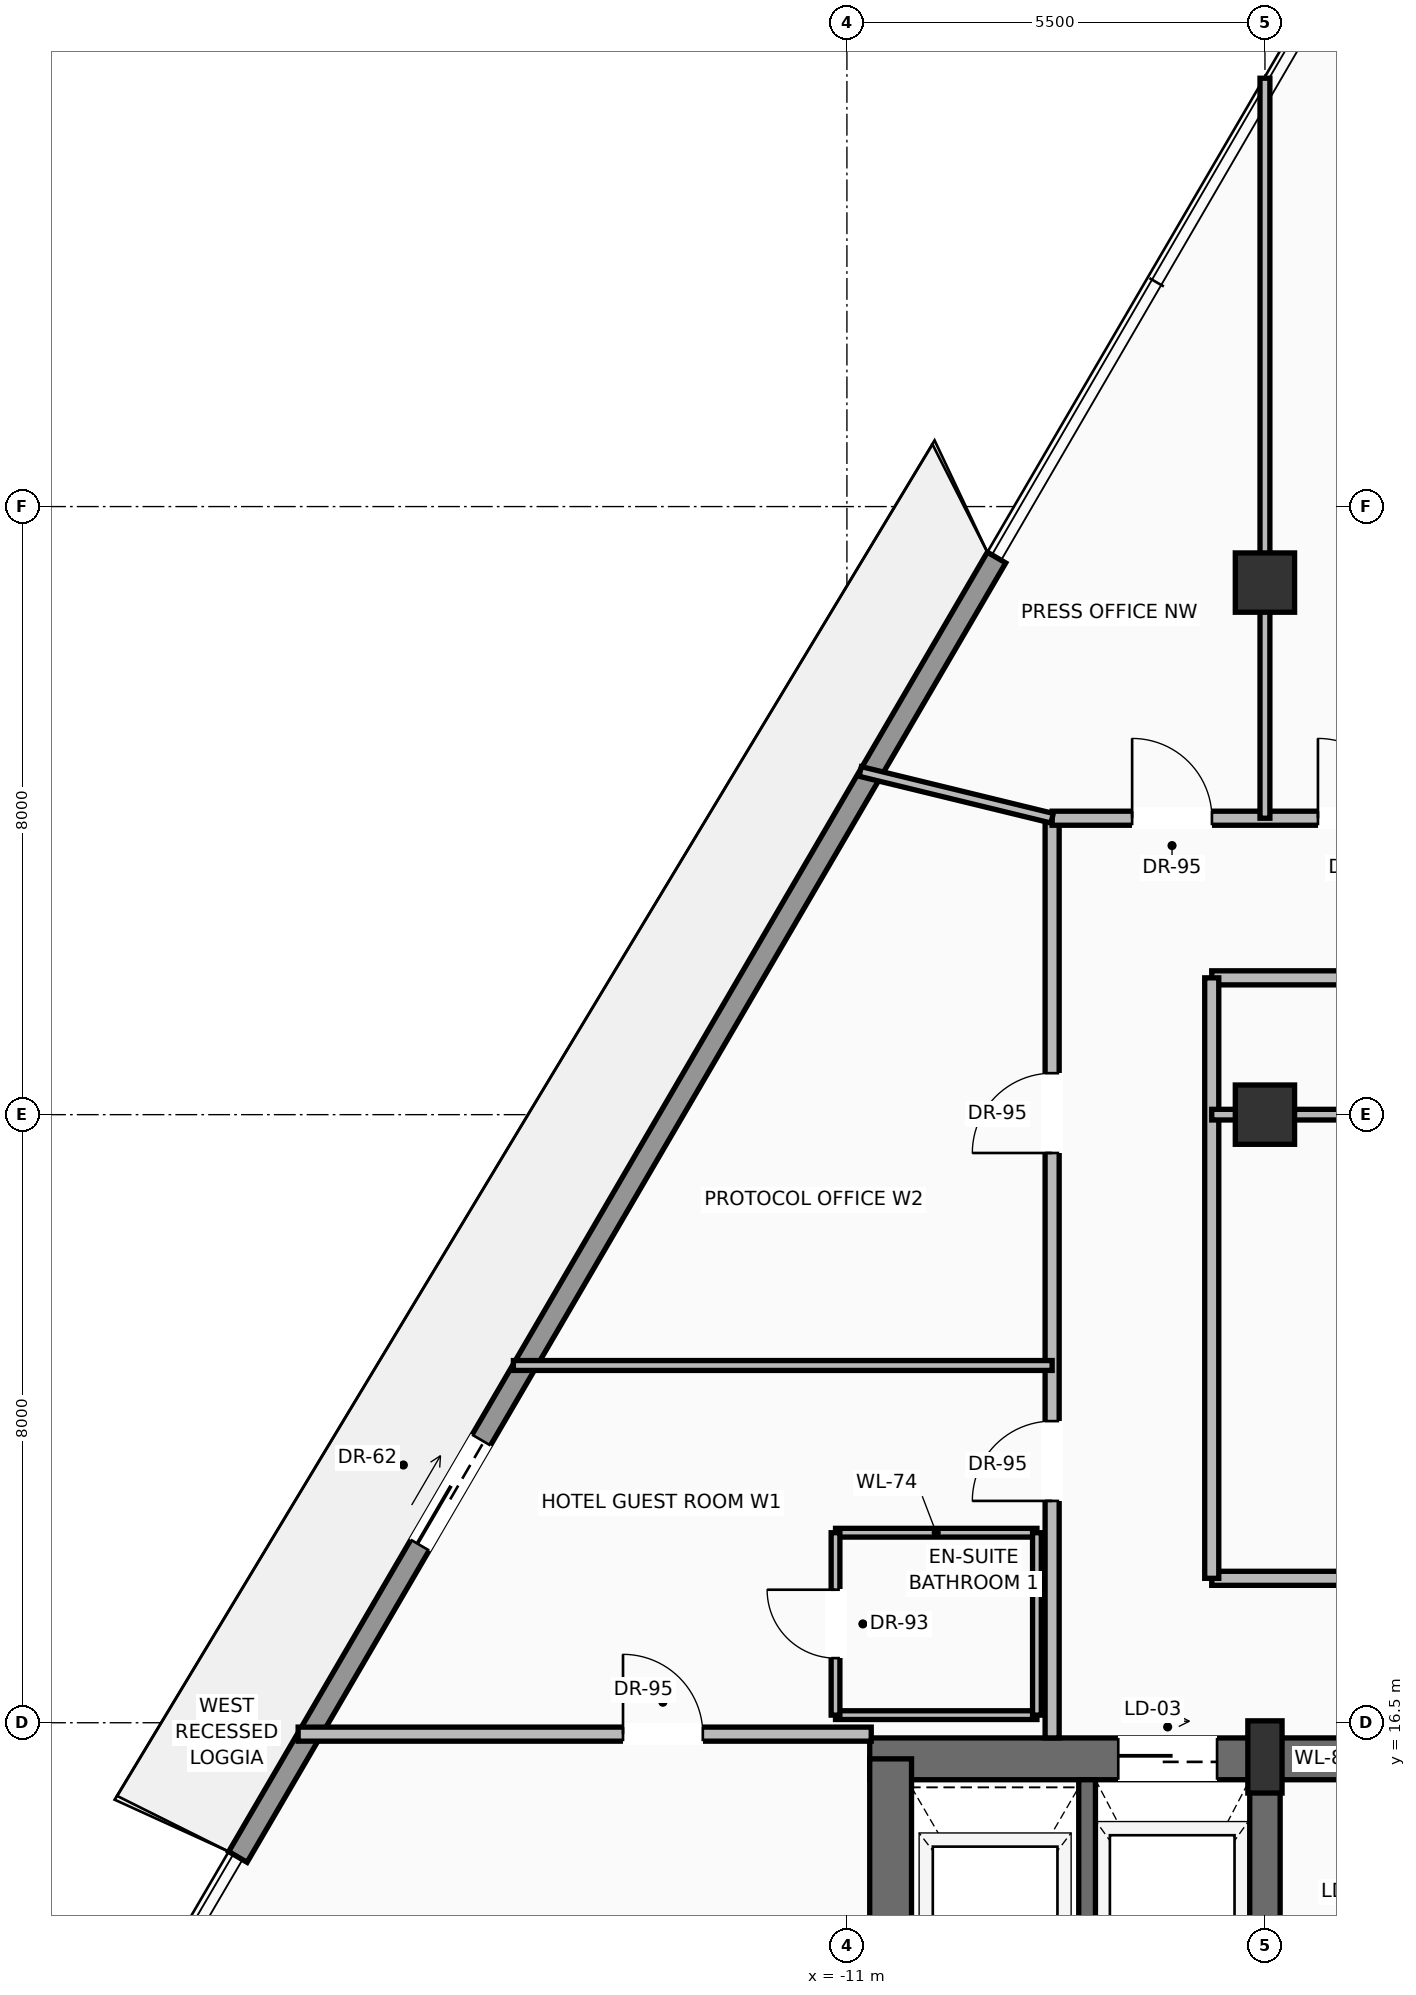
"""IFC4 building model, lengths in metres.
Left out: names, types, materials, properties, quantities, classifications, styles, units other than length and angle.
Written with IfcOpenShell. Run it as: python <this file> out.ifc"""

import sys

from ifc_helpers import new_model, si_unit, direction, frame, frame_2d, origin, origin_2d, place, context, subcontext, project, spatial, rectangle, extrude, source, transform, mapped, element, fill, save


model = new_model("IFC4")
c1 = context("Model", 3, precision=1e-05, world=origin(), true_north=direction((0.0, 1.0)))
c2 = subcontext(c1, "Body", "Model", "MODEL_VIEW")
j1 = project(units=[si_unit("LENGTHUNIT", "METRE"), si_unit("PLANEANGLEUNIT", "RADIAN")], contexts=[c1])
p1 = place(None, origin())
s1 = spatial("IfcSite", under=j1, at=p1, CompositionType="ELEMENT")
p2 = place(p1, origin())
s2 = spatial("IfcBuilding", under=s1, at=p2, CompositionType="ELEMENT")
p3 = place(p2, frame((0.0, 0.0, 254.5)))
s3 = spatial("IfcBuildingStorey", under=s2, at=p3, CompositionType="ELEMENT", Elevation=254.5)
p4 = place(p3, frame((-10.7, 16.025, 0.0), z_axis=(0.0, 0.0, 1.0), x_axis=(1.0, 0.0, 0.0)))
e1 = element("IfcWall", 1, at=p4, inside=s3, PredefinedType="SHEAR", context=c2, shape_type="SweptSolid", body=[
    extrude(rectangle(XDim=21.4, YDim=0.55, at=frame_2d((10.7, 0.0))), origin(), (0.0, 0.0, 1.0), 3.15),
])
p5 = place(p4, frame((3.27, 0.0, 0.0)))
e2 = element("IfcOpeningElement", 2, at=p5, cuts=e1, PredefinedType="OPENING", context=c2, shape_type="SweptSolid", body=[
    extrude(rectangle(XDim=1.3, YDim=2.3, at=frame_2d((0.65, 1.15))), frame((0.0, 0.285, 0.0), z_axis=(0.0, -1.0, 0.0), x_axis=(1.0, 0.0, 0.0)), (0.0, 0.0, 1.0), 0.57),
])
p6 = place(p4, frame((9.7, 0.0, 0.0)))
e3 = element("IfcOpeningElement", 3, at=p6, cuts=e1, PredefinedType="OPENING", context=c2, shape_type="SweptSolid", body=[
    extrude(rectangle(XDim=2.0, YDim=2.4, at=frame_2d((1.0, 1.2))), frame((0.0, 0.285, 0.0), z_axis=(0.0, -1.0, 0.0), x_axis=(1.0, 0.0, 0.0)), (0.0, 0.0, 1.0), 0.57),
])
p7 = place(p3, frame((-10.425, 0.575, 0.0), z_axis=(0.0, 0.0, 1.0), x_axis=(0.0, 1.0, 0.0)))
e4 = element("IfcWall", 4, at=p7, inside=s3, PredefinedType="SHEAR", context=c2, shape_type="SweptSolid", body=[
    extrude(rectangle(XDim=15.45, YDim=0.55, at=frame_2d((7.725, 0.0))), origin(), (0.0, 0.0, 1.0), 3.15),
])
p8 = place(p3, frame((-5.5, 0.575, 0.0), z_axis=(0.0, 0.0, 1.0), x_axis=(0.0, 1.0, 0.0)))
e5 = element("IfcWall", 5, at=p8, inside=s3, PredefinedType="SHEAR", context=c2, shape_type="SweptSolid", body=[
    extrude(rectangle(XDim=15.45, YDim=0.4, at=frame_2d((7.725, 0.0))), origin(), (0.0, 0.0, 1.0), 3.15),
])
p9 = place(p8, frame((8.925, 0.0, 0.0)))
e6 = element("IfcOpeningElement", 6, at=p9, cuts=e5, PredefinedType="OPENING", context=c2, shape_type="SweptSolid", body=[
    extrude(rectangle(XDim=1.1, YDim=2.2, at=frame_2d((0.55, 1.1))), frame((0.0, 0.21, 0.0), z_axis=(0.0, -1.0, 0.0), x_axis=(1.0, 0.0, 0.0)), (0.0, 0.0, 1.0), 0.42),
])
m1 = source(origin(), c2, "Body", "SweptSolid", [
    extrude(rectangle(XDim=0.45, YDim=0.95, at=origin_2d()), origin(), (0.0, 0.0, 1.0), 3.45),
])
p10 = place(p3, frame((-5.5, 16.05, 0.0), z_axis=(0.0, 0.0, 1.0), x_axis=(1.0, 0.0, 0.0)))
e7 = element("IfcColumn", 7, at=p10, inside=s3, PredefinedType="PILASTER", context=c2, shape_type="MappedRepresentation", body=[
    mapped(m1, transform((0.0, 0.0, 0.0), scale=1.0)),
])
m2 = source(origin(), c2, "Body", "SweptSolid", [
    extrude(rectangle(XDim=0.78, YDim=0.78, at=origin_2d()), origin(), (0.0, 0.0, 1.0), 3.45),
])
for number, where, z_axis, x_axis in (
    (8, (-5.5, 24.5, 0.0), (0.0, 0.0, 1.0), (1.0, 0.0, 0.0)),
    (9, (-5.5, 31.5, 0.0), (0.0, 0.0, 1.0), (1.0, 0.0, 0.0)),
):
    element("IfcColumn", number, at=place(p3, frame(where, z_axis=z_axis, x_axis=x_axis)), inside=s3, PredefinedType="COLUMN", context=c2, shape_type="MappedRepresentation", body=[
        mapped(m2, transform((0.0, 0.0, 0.0), scale=1.0)),
    ])
p11 = place(p3, frame((-19.013, 14.734, 0.0), z_axis=(0.0, 0.0, 1.0), x_axis=(0.504219118022, 0.863575752914, 0.0)))
e10 = element("IfcWall", 10, at=p11, inside=s3, PredefinedType="SOLIDWALL", context=c2, shape_type="SweptSolid", body=[
    extrude(rectangle(XDim=19.796, YDim=0.28, at=frame_2d((9.898, 0.0))), origin(), (0.0, 0.0, 1.0), 2.73),
])
p12 = place(p11, frame((4.751, 0.0, 0.0)))
e11 = element("IfcOpeningElement", 11, at=p12, cuts=e10, PredefinedType="OPENING", context=c2, shape_type="SweptSolid", body=[
    extrude(rectangle(XDim=1.6, YDim=2.35, at=frame_2d((0.8, 1.175))), frame((0.0, 0.15, 0.0), z_axis=(0.0, -1.0, 0.0), x_axis=(1.0, 0.0, 0.0)), (0.0, 0.0, 1.0), 0.3),
])
p13 = place(p3, frame((-7.84, 11.87, 0.0), z_axis=(0.0, 0.0, 1.0), x_axis=(0.0, 1.0, 0.0)))
e12 = element("IfcWall", 12, at=p13, inside=s3, PredefinedType="SOLIDWALL", context=c2, shape_type="SweptSolid", body=[
    extrude(rectangle(XDim=3.88, YDim=0.22, at=frame_2d((1.94, 0.0))), origin(), (0.0, 0.0, 1.0), 3.15),
])
p14 = place(p3, frame((-6.2, 18.4, 0.0), z_axis=(0.0, 0.0, 1.0), x_axis=(1.0, 0.0, 0.0)))
e13 = element("IfcWall", 13, at=p14, inside=s3, PredefinedType="PARTITIONING", context=c2, shape_type="SweptSolid", body=[
    extrude(rectangle(XDim=12.6, YDim=0.185, at=frame_2d((6.3, 0.0))), origin(), (0.0, 0.0, 1.0), 3.142),
])
p15 = place(p14, frame((5.825, 0.0, 0.0)))
e14 = element("IfcOpeningElement", 14, at=p15, cuts=e13, PredefinedType="OPENING", context=c2, shape_type="SweptSolid", body=[
    extrude(rectangle(XDim=0.95, YDim=2.2, at=frame_2d((0.475, 1.1))), frame((0.0, 0.103, 0.0), z_axis=(0.0, -1.0, 0.0), x_axis=(1.0, 0.0, 0.0)), (0.0, 0.0, 1.0), 0.205),
])
p16 = place(p3, frame((-6.2, 26.3, 0.0), z_axis=(0.0, 0.0, 1.0), x_axis=(1.0, 0.0, 0.0)))
e15 = element("IfcWall", 15, at=p16, inside=s3, PredefinedType="PARTITIONING", context=c2, shape_type="SweptSolid", body=[
    extrude(rectangle(XDim=12.6, YDim=0.185, at=frame_2d((6.3, 0.0))), origin(), (0.0, 0.0, 1.0), 3.142),
])
p17 = place(p16, frame((5.825, 0.0, 0.0)))
e16 = element("IfcOpeningElement", 16, at=p17, cuts=e15, PredefinedType="OPENING", context=c2, shape_type="SweptSolid", body=[
    extrude(rectangle(XDim=0.95, YDim=2.2, at=frame_2d((0.475, 1.1))), frame((0.0, 0.103, 0.0), z_axis=(0.0, -1.0, 0.0), x_axis=(1.0, 0.0, 0.0)), (0.0, 0.0, 1.0), 0.205),
])
p18 = place(p3, frame((-6.2, 18.4, 0.0), z_axis=(0.0, 0.0, 1.0), x_axis=(0.0, 1.0, 0.0)))
e17 = element("IfcWall", 17, at=p18, inside=s3, PredefinedType="PARTITIONING", context=c2, shape_type="SweptSolid", body=[
    extrude(rectangle(XDim=7.9, YDim=0.185, at=frame_2d((3.95, 0.0))), origin(), (0.0, 0.0, 1.0), 3.142),
])
p19 = place(p3, frame((-8.3, 16.3, 0.0), z_axis=(0.0, 0.0, 1.0), x_axis=(0.0, 1.0, 0.0)))
e18 = element("IfcWall", 18, at=p19, inside=s3, PredefinedType="PARTITIONING", context=c2, shape_type="SweptSolid", body=[
    extrude(rectangle(XDim=12.1, YDim=0.185, at=frame_2d((6.05, 0.0))), origin(), (0.0, 0.0, 1.0), 3.142),
])
p20 = place(p19, frame((3.118, 0.0, 0.0)))
e19 = element("IfcOpeningElement", 19, at=p20, cuts=e18, PredefinedType="OPENING", context=c2, shape_type="SweptSolid", body=[
    extrude(rectangle(XDim=1.05, YDim=2.25, at=frame_2d((0.525, 1.125))), frame((0.0, 0.103, 0.0), z_axis=(0.0, -1.0, 0.0), x_axis=(1.0, 0.0, 0.0)), (0.0, 0.0, 1.0), 0.205),
])
p21 = place(p19, frame((7.696, 0.0, 0.0)))
e20 = element("IfcOpeningElement", 20, at=p21, cuts=e18, PredefinedType="OPENING", context=c2, shape_type="SweptSolid", body=[
    extrude(rectangle(XDim=1.05, YDim=2.25, at=frame_2d((0.525, 1.125))), frame((0.0, 0.103, 0.0), z_axis=(0.0, -1.0, 0.0), x_axis=(1.0, 0.0, 0.0)), (0.0, 0.0, 1.0), 0.205),
])
p22 = place(p3, frame((-8.3, 28.4, 0.0), z_axis=(0.0, 0.0, 1.0), x_axis=(1.0, 0.0, 0.0)))
e21 = element("IfcWall", 21, at=p22, inside=s3, PredefinedType="PARTITIONING", context=c2, shape_type="SweptSolid", body=[
    extrude(rectangle(XDim=16.8, YDim=0.185, at=frame_2d((8.4, 0.0))), origin(), (0.0, 0.0, 1.0), 3.142),
])
p23 = place(p22, frame((3.498, 0.0, 0.0)))
e22 = element("IfcOpeningElement", 22, at=p23, cuts=e21, PredefinedType="OPENING", context=c2, shape_type="SweptSolid", body=[
    extrude(rectangle(XDim=1.05, YDim=2.25, at=frame_2d((0.525, 1.125))), frame((0.0, 0.103, 0.0), z_axis=(0.0, -1.0, 0.0), x_axis=(1.0, 0.0, 0.0)), (0.0, 0.0, 1.0), 0.205),
])
p24 = place(p22, frame((8.998, 0.0, 0.0)))
e23 = element("IfcOpeningElement", 23, at=p24, cuts=e21, PredefinedType="OPENING", context=c2, shape_type="SweptSolid", body=[
    extrude(rectangle(XDim=1.05, YDim=2.25, at=frame_2d((0.525, 1.125))), frame((0.0, 0.103, 0.0), z_axis=(0.0, -1.0, 0.0), x_axis=(1.0, 0.0, 0.0)), (0.0, 0.0, 1.0), 0.205),
])
p25 = place(p22, frame((12.052, 0.0, 0.0)))
e24 = element("IfcOpeningElement", 24, at=p25, cuts=e21, PredefinedType="OPENING", context=c2, shape_type="SweptSolid", body=[
    extrude(rectangle(XDim=1.05, YDim=2.25, at=frame_2d((0.525, 1.125))), frame((0.0, 0.103, 0.0), z_axis=(0.0, -1.0, 0.0), x_axis=(1.0, 0.0, 0.0)), (0.0, 0.0, 1.0), 0.205),
])
p26 = place(p22, frame((14.498, 0.0, 0.0)))
e25 = element("IfcOpeningElement", 25, at=p26, cuts=e21, PredefinedType="OPENING", context=c2, shape_type="SweptSolid", body=[
    extrude(rectangle(XDim=1.05, YDim=2.25, at=frame_2d((0.525, 1.125))), frame((0.0, 0.103, 0.0), z_axis=(0.0, -1.0, 0.0), x_axis=(1.0, 0.0, 0.0)), (0.0, 0.0, 1.0), 0.205),
])
p27 = place(p22, frame((1.052, 0.0, 0.0)))
e26 = element("IfcOpeningElement", 26, at=p27, cuts=e21, PredefinedType="OPENING", context=c2, shape_type="SweptSolid", body=[
    extrude(rectangle(XDim=1.05, YDim=2.25, at=frame_2d((0.525, 1.125))), frame((0.0, 0.103, 0.0), z_axis=(0.0, -1.0, 0.0), x_axis=(1.0, 0.0, 0.0)), (0.0, 0.0, 1.0), 0.205),
])
p28 = place(p3, frame((-6.2, 24.5, 0.0), z_axis=(0.0, 0.0, 1.0), x_axis=(1.0, 0.0, 0.0)))
e27 = element("IfcWall", 27, at=p28, inside=s3, PredefinedType="PARTITIONING", context=c2, shape_type="SweptSolid", body=[
    extrude(rectangle(XDim=12.6, YDim=0.14, at=frame_2d((6.3, 0.0))), origin(), (0.0, 0.0, 1.0), 2.593),
])
p29 = place(p3, frame((-18.22, 16.35, 0.0), z_axis=(0.0, 0.0, 1.0), x_axis=(1.0, 0.0, 0.0)))
e28 = element("IfcWall", 28, at=p29, inside=s3, PredefinedType="PARTITIONING", context=c2, shape_type="SweptSolid", body=[
    extrude(rectangle(XDim=7.54, YDim=0.185, at=frame_2d((3.77, 0.0))), origin(), (0.0, 0.0, 1.0), 3.142),
])
p30 = place(p29, frame((4.274, 0.0, 0.0)))
e29 = element("IfcOpeningElement", 29, at=p30, cuts=e28, PredefinedType="OPENING", context=c2, shape_type="SweptSolid", body=[
    extrude(rectangle(XDim=1.05, YDim=2.25, at=frame_2d((0.525, 1.125))), frame((0.0, 0.103, 0.0), z_axis=(0.0, -1.0, 0.0), x_axis=(1.0, 0.0, 0.0)), (0.0, 0.0, 1.0), 0.205),
])
p31 = place(p3, frame((-10.825, 29.015, 0.0), z_axis=(0.0, 0.0, 1.0), x_axis=(0.971578327302, -0.236718300764, 0.0)))
e30 = element("IfcWall", 30, at=p31, inside=s3, PredefinedType="PARTITIONING", context=c2, shape_type="SweptSolid", body=[
    extrude(rectangle(XDim=2.599, YDim=0.13, at=frame_2d((1.3, 0.0))), origin(), (0.0, 0.0, 1.0), 3.142),
])
p32 = place(p3, frame((-5.5, 28.4, 0.0), z_axis=(0.0, 0.0, 1.0), x_axis=(0.0, 1.0, 0.0)))
e31 = element("IfcWall", 31, at=p32, inside=s3, PredefinedType="PARTITIONING", context=c2, shape_type="SweptSolid", body=[
    extrude(rectangle(XDim=9.736, YDim=0.13, at=frame_2d((4.868, 0.0))), origin(), (0.0, 0.0, 1.0), 2.593),
])
for number, where, z_axis, x_axis in (
    (32, (-11.15, 16.6, 0.0), (0.0, 0.0, 1.0), (1.0, 0.0, 0.0)),
    (33, (-11.15, 19.0, 0.0), (0.0, 0.0, 1.0), (1.0, 0.0, 0.0)),
):
    element("IfcWall", number, at=place(p3, frame(where, z_axis=z_axis, x_axis=x_axis)), inside=s3, PredefinedType="PARTITIONING", context=c2, shape_type="SweptSolid", body=[
        extrude(rectangle(XDim=2.65, YDim=0.115, at=frame_2d((1.325, 0.0))), origin(), (0.0, 0.0, 1.0), 3.142),
    ])
p33 = place(p3, frame((-11.15, 16.6, 0.0), z_axis=(0.0, 0.0, 1.0), x_axis=(0.0, 1.0, 0.0)))
e34 = element("IfcWall", 34, at=p33, inside=s3, PredefinedType="PARTITIONING", context=c2, shape_type="SweptSolid", body=[
    extrude(rectangle(XDim=2.4, YDim=0.115, at=frame_2d((1.2, 0.0))), origin(), (0.0, 0.0, 1.0), 3.142),
])
p34 = place(p33, frame((0.75, 0.0, 0.0)))
e35 = element("IfcOpeningElement", 35, at=p34, cuts=e34, PredefinedType="OPENING", context=c2, shape_type="SweptSolid", body=[
    extrude(rectangle(XDim=0.9, YDim=2.15, at=frame_2d((0.45, 1.075))), frame((0.0, 0.067, 0.0), z_axis=(0.0, -1.0, 0.0), x_axis=(1.0, 0.0, 0.0)), (0.0, 0.0, 1.0), 0.135),
])
p35 = place(p3, frame((-8.5, 16.6, 0.0), z_axis=(0.0, 0.0, 1.0), x_axis=(0.0, 1.0, 0.0)))
e36 = element("IfcWall", 36, at=p35, inside=s3, PredefinedType="PARTITIONING", context=c2, shape_type="SweptSolid", body=[
    extrude(rectangle(XDim=2.4, YDim=0.115, at=frame_2d((1.2, 0.0))), origin(), (0.0, 0.0, 1.0), 3.142),
])
p36 = place(p3, frame((-15.388, 21.2, 0.0), z_axis=(0.0, 0.0, 1.0), x_axis=(1.0, 0.0, 0.0)))
e37 = element("IfcWall", 37, at=p36, inside=s3, PredefinedType="PARTITIONING", context=c2, shape_type="SweptSolid", body=[
    extrude(rectangle(XDim=7.088, YDim=0.13, at=frame_2d((3.544, 0.0))), origin(), (0.0, 0.0, 1.0), 3.142),
])
m3 = source(origin(), c2, "Body", "SweptSolid", [
    extrude(rectangle(XDim=1.6, YDim=2.35, at=frame_2d((0.8, 1.175))), frame((0.0, 0.025, 0.0), z_axis=(0.0, -1.0, 0.0), x_axis=(1.0, 0.0, 0.0)), (0.0, 0.0, 1.0), 0.05),
])
p37 = place(p12, origin())
e38 = element("IfcDoor", 38, at=p37, inside=s3, OperationType="SLIDING_TO_LEFT", PredefinedType="DOOR", context=c2, shape_type="MappedRepresentation", body=[
    mapped(m3, transform((0.0, 0.0, 0.0), scale=1.0)),
])
fill(e11, e38)
m4 = source(origin(), c2, "Body", "SweptSolid", [
    extrude(rectangle(XDim=1.3, YDim=2.3, at=frame_2d((0.65, 1.15))), frame((0.0, 0.025, 0.0), z_axis=(0.0, -1.0, 0.0), x_axis=(1.0, 0.0, 0.0)), (0.0, 0.0, 1.0), 0.05),
])
p38 = place(p5, origin())
e39 = element("IfcDoor", 39, at=p38, inside=s3, OperationType="SLIDING_TO_RIGHT", PredefinedType="DOOR", context=c2, shape_type="MappedRepresentation", body=[
    mapped(m4, transform((0.0, 0.0, 0.0), scale=1.0)),
])
fill(e2, e39)
m5 = source(origin(), c2, "Body", "SweptSolid", [
    extrude(rectangle(XDim=1.05, YDim=2.25, at=frame_2d((0.525, 1.125))), frame((0.0, 0.025, 0.0), z_axis=(0.0, -1.0, 0.0), x_axis=(1.0, 0.0, 0.0)), (0.0, 0.0, 1.0), 0.05),
])
p39 = place(p30, origin())
e40 = element("IfcDoor", 40, at=p39, inside=s3, OperationType="SINGLE_SWING_LEFT", PredefinedType="DOOR", context=c2, shape_type="MappedRepresentation", body=[
    mapped(m5, transform((0.0, 0.0, 0.0), scale=1.0)),
])
fill(e29, e40)
p40 = place(p20, origin())
e41 = element("IfcDoor", 41, at=p40, inside=s3, OperationType="SINGLE_SWING_LEFT", PredefinedType="DOOR", context=c2, shape_type="MappedRepresentation", body=[
    mapped(m5, transform((0.0, 0.0, 0.0), scale=1.0)),
])
fill(e19, e41)
m6 = source(origin(), c2, "Body", "SweptSolid", [
    extrude(rectangle(XDim=0.9, YDim=2.15, at=frame_2d((0.45, 1.075))), frame((0.0, 0.025, 0.0), z_axis=(0.0, -1.0, 0.0), x_axis=(1.0, 0.0, 0.0)), (0.0, 0.0, 1.0), 0.05),
])
p41 = place(p34, origin())
e42 = element("IfcDoor", 42, at=p41, inside=s3, OperationType="SINGLE_SWING_RIGHT", PredefinedType="DOOR", context=c2, shape_type="MappedRepresentation", body=[
    mapped(m6, transform((0.0, 0.0, 0.0), scale=1.0)),
])
fill(e35, e42)
p42 = place(p21, origin())
e43 = element("IfcDoor", 43, at=p42, inside=s3, OperationType="SINGLE_SWING_LEFT", PredefinedType="DOOR", context=c2, shape_type="MappedRepresentation", body=[
    mapped(m5, transform((0.0, 0.0, 0.0), scale=1.0)),
])
fill(e20, e43)
p43 = place(p23, origin())
e44 = element("IfcDoor", 44, at=p43, inside=s3, OperationType="SINGLE_SWING_LEFT", PredefinedType="DOOR", context=c2, shape_type="MappedRepresentation", body=[
    mapped(m5, transform((0.0, 0.0, 0.0), scale=1.0)),
])
fill(e22, e44)
p44 = place(p27, origin())
e45 = element("IfcDoor", 45, at=p44, inside=s3, OperationType="SINGLE_SWING_LEFT", PredefinedType="DOOR", context=c2, shape_type="MappedRepresentation", body=[
    mapped(m5, transform((0.0, 0.0, 0.0), scale=1.0)),
])
fill(e26, e45)
save(model, sys.argv[1])
